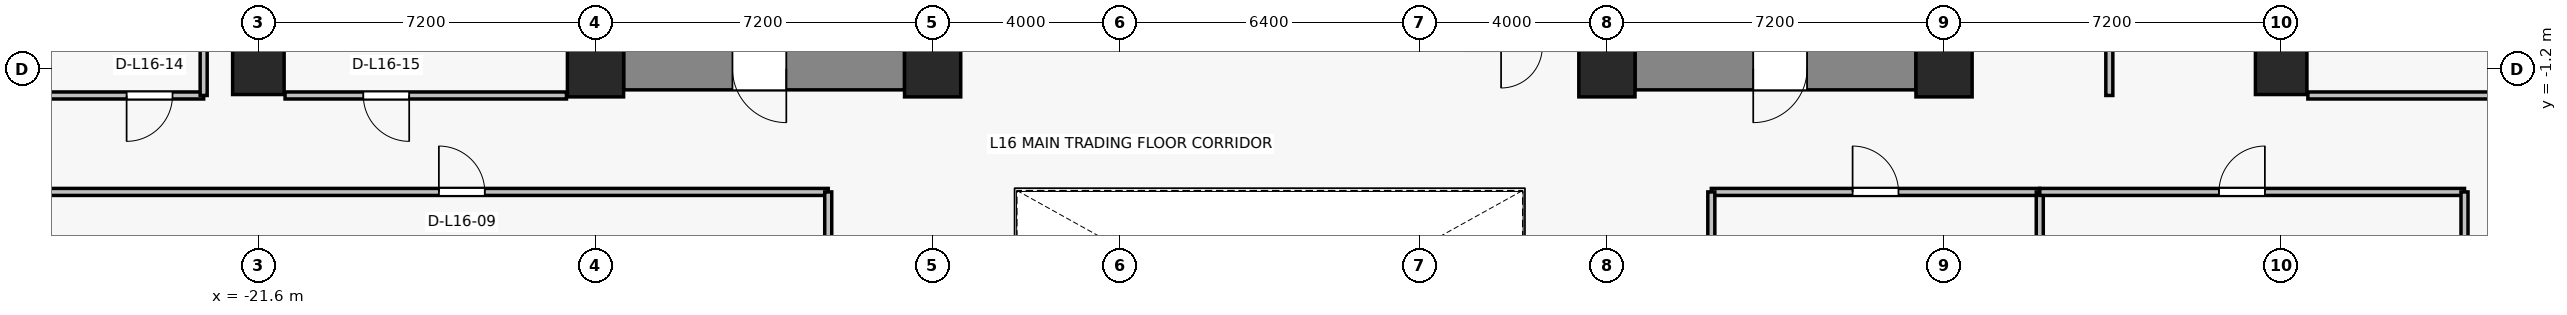
"""IFC4 building model, lengths in metres.
Left out: names, types, materials, properties, quantities, classifications, styles, units other than length and angle.
Written with IfcOpenShell. Run it as: python <this file> out.ifc"""

import sys

from ifc_helpers import new_model, si_unit, direction, frame, frame_2d, origin, origin_2d, place, context, subcontext, project, spatial, rectangle, extrude, source, transform, mapped, element, fill, save


model = new_model("IFC4")
c1 = context("Model", 3, precision=1e-05, world=origin(), true_north=direction((0.0, 1.0)))
c2 = subcontext(c1, "Body", "Model", "MODEL_VIEW")
j1 = project(units=[si_unit("LENGTHUNIT", "METRE"), si_unit("PLANEANGLEUNIT", "RADIAN")], contexts=[c1])
p1 = place(None, origin())
s1 = spatial("IfcSite", under=j1, at=p1, CompositionType="ELEMENT")
p2 = place(p1, origin())
s2 = spatial("IfcBuilding", under=s1, at=p2, CompositionType="ELEMENT")
p3 = place(p2, frame((0.0, 0.0, 60.4)))
s3 = spatial("IfcBuildingStorey", under=s2, at=p3, CompositionType="ELEMENT", Elevation=60.4)
for number, where, z_axis, x_axis in (
    (1, (-14.4, -1.2, 0.0), (0.0, 0.0, 1.0), (1.0, 0.0, 0.0)),
    (2, (-7.2, -1.2, 0.0), (0.0, 0.0, 1.0), (1.0, 0.0, 0.0)),
    (3, (7.2, -1.2, 0.0), (0.0, 0.0, 1.0), (1.0, 0.0, 0.0)),
    (4, (14.4, -1.2, 0.0), (0.0, 0.0, 1.0), (1.0, 0.0, 0.0)),
):
    element("IfcColumn", number, at=place(p3, frame(where, z_axis=z_axis, x_axis=x_axis)), inside=s3, PredefinedType="COLUMN", context=c2, shape_type="SweptSolid", body=[
        extrude(rectangle(XDim=1.2, YDim=1.2, at=origin_2d()), origin(), (0.0, 0.0, 1.0), 3.3),
    ])
for number, where, z_axis, x_axis in (
    (5, (-21.6, -1.2, 0.0), (0.0, 0.0, 1.0), (1.0, 0.0, 0.0)),
    (6, (21.6, -1.2, 0.0), (0.0, 0.0, 1.0), (1.0, 0.0, 0.0)),
):
    element("IfcColumn", number, at=place(p3, frame(where, z_axis=z_axis, x_axis=x_axis)), inside=s3, PredefinedType="COLUMN", context=c2, shape_type="SweptSolid", body=[
        extrude(rectangle(XDim=1.1, YDim=1.1, at=origin_2d()), origin(), (0.0, 0.0, 1.0), 3.3),
    ])
p4 = place(p3, frame((-7.8, -1.2, 0.0), z_axis=(0.0, 0.0, 1.0), x_axis=(-1.0, 0.0, 0.0)))
e7 = element("IfcWall", 7, at=p4, inside=s3, PredefinedType="SHEAR", context=c2, shape_type="SweptSolid", body=[
    extrude(rectangle(XDim=6.0, YDim=0.9, at=frame_2d((3.0, 0.0))), origin(), (0.0, 0.0, 1.0), 3.075),
])
p5 = place(p4, frame((2.525, 0.0, 0.0)))
e8 = element("IfcOpeningElement", 8, at=p5, cuts=e7, PredefinedType="OPENING", context=c2, shape_type="SweptSolid", body=[
    extrude(rectangle(XDim=1.15, YDim=2.15, at=frame_2d((0.575, 1.075))), frame((0.0, 0.46, 0.0), z_axis=(0.0, -1.0, 0.0), x_axis=(1.0, 0.0, 0.0)), (0.0, 0.0, 1.0), 0.92),
])
p6 = place(p3, frame((13.8, -1.2, 0.0), z_axis=(0.0, 0.0, 1.0), x_axis=(-1.0, 0.0, 0.0)))
e9 = element("IfcWall", 9, at=p6, inside=s3, PredefinedType="SHEAR", context=c2, shape_type="SweptSolid", body=[
    extrude(rectangle(XDim=6.0, YDim=0.9, at=frame_2d((3.0, 0.0))), origin(), (0.0, 0.0, 1.0), 3.075),
])
p7 = place(p6, frame((2.325, 0.0, 0.0)))
e10 = element("IfcOpeningElement", 10, at=p7, cuts=e9, PredefinedType="OPENING", context=c2, shape_type="SweptSolid", body=[
    extrude(rectangle(XDim=1.15, YDim=2.15, at=frame_2d((0.575, 1.075))), frame((0.0, 0.46, 0.0), z_axis=(0.0, -1.0, 0.0), x_axis=(1.0, 0.0, 0.0)), (0.0, 0.0, 1.0), 0.92),
])
p8 = place(p3, frame((-28.53, -3.83, 0.0), z_axis=(0.0, 0.0, 1.0), x_axis=(1.0, 0.0, 0.0)))
e11 = element("IfcWall", 11, at=p8, inside=s3, PredefinedType="PARTITIONING", context=c2, shape_type="SweptSolid", body=[
    extrude(rectangle(XDim=19.1, YDim=0.15, at=frame_2d((9.55, 0.0))), origin(), (0.0, 0.0, 1.0), 2.465),
])
p9 = place(p8, frame((10.785, 0.0, 0.0)))
e12 = element("IfcOpeningElement", 12, at=p9, cuts=e11, PredefinedType="OPENING", context=c2, shape_type="SweptSolid", body=[
    extrude(rectangle(XDim=0.98, YDim=2.15, at=frame_2d((0.49, 1.075))), frame((0.0, 0.085, 0.0), z_axis=(0.0, -1.0, 0.0), x_axis=(1.0, 0.0, 0.0)), (0.0, 0.0, 1.0), 0.17),
])
p10 = place(p3, frame((-9.43, -3.83, 0.0), z_axis=(0.0, 0.0, 1.0), x_axis=(0.0, -1.0, 0.0)))
e13 = element("IfcWall", 13, at=p10, inside=s3, PredefinedType="PARTITIONING", context=c2, shape_type="SweptSolid", body=[
    extrude(rectangle(XDim=8.49, YDim=0.15, at=frame_2d((4.245, 0.0))), origin(), (0.0, 0.0, 1.0), 2.465),
])
p11 = place(p3, frame((9.43, -3.83, 0.0), z_axis=(0.0, 0.0, 1.0), x_axis=(1.0, 0.0, 0.0)))
e14 = element("IfcWall", 14, at=p11, inside=s3, PredefinedType="PARTITIONING", context=c2, shape_type="SweptSolid", body=[
    extrude(rectangle(XDim=7.015, YDim=0.15, at=frame_2d((3.507, 0.0))), origin(), (0.0, 0.0, 1.0), 2.465),
])
p12 = place(p11, frame((3.017, 0.0, 0.0)))
e15 = element("IfcOpeningElement", 15, at=p12, cuts=e14, PredefinedType="OPENING", context=c2, shape_type="SweptSolid", body=[
    extrude(rectangle(XDim=0.98, YDim=2.15, at=frame_2d((0.49, 1.075))), frame((0.0, 0.085, 0.0), z_axis=(0.0, -1.0, 0.0), x_axis=(1.0, 0.0, 0.0)), (0.0, 0.0, 1.0), 0.17),
])
for number, where, z_axis, x_axis in (
    (16, (9.43, -12.32, 0.0), (0.0, 0.0, 1.0), (0.0, 1.0, 0.0)),
    (17, (16.445, -3.83, 0.0), (0.0, 0.0, 1.0), (0.0, -1.0, 0.0)),
):
    element("IfcWall", number, at=place(p3, frame(where, z_axis=z_axis, x_axis=x_axis)), inside=s3, PredefinedType="PARTITIONING", context=c2, shape_type="SweptSolid", body=[
        extrude(rectangle(XDim=8.49, YDim=0.15, at=frame_2d((4.245, 0.0))), origin(), (0.0, 0.0, 1.0), 2.465),
    ])
p13 = place(p3, frame((16.445, -3.83, 0.0), z_axis=(0.0, 0.0, 1.0), x_axis=(1.0, 0.0, 0.0)))
e18 = element("IfcWall", 18, at=p13, inside=s3, PredefinedType="PARTITIONING", context=c2, shape_type="SweptSolid", body=[
    extrude(rectangle(XDim=9.071, YDim=0.15, at=frame_2d((4.535, 0.0))), origin(), (0.0, 0.0, 1.0), 2.465),
])
p14 = place(p13, frame((3.827, 0.0, 0.0)))
e19 = element("IfcOpeningElement", 19, at=p14, cuts=e18, PredefinedType="OPENING", context=c2, shape_type="SweptSolid", body=[
    extrude(rectangle(XDim=0.98, YDim=2.15, at=frame_2d((0.49, 1.075))), frame((0.0, 0.085, 0.0), z_axis=(0.0, -1.0, 0.0), x_axis=(1.0, 0.0, 0.0)), (0.0, 0.0, 1.0), 0.17),
])
p15 = place(p3, frame((25.515, -3.83, 0.0), z_axis=(0.0, 0.0, 1.0), x_axis=(0.0, -1.0, 0.0)))
e20 = element("IfcWall", 20, at=p15, inside=s3, PredefinedType="PARTITIONING", context=c2, shape_type="SweptSolid", body=[
    extrude(rectangle(XDim=8.49, YDim=0.15, at=frame_2d((4.245, 0.0))), origin(), (0.0, 0.0, 1.0), 2.465),
])
p16 = place(p3, frame((-22.769, -1.77, 0.0), z_axis=(0.0, 0.0, 1.0), x_axis=(-1.0, 0.0, 0.0)))
e21 = element("IfcWall", 21, at=p16, inside=s3, PredefinedType="PARTITIONING", context=c2, shape_type="SweptSolid", body=[
    extrude(rectangle(XDim=5.761, YDim=0.15, at=frame_2d((2.881, 0.0))), origin(), (0.0, 0.0, 1.0), 2.465),
])
p17 = place(p16, frame((0.666, 0.0, 0.0)))
e22 = element("IfcOpeningElement", 22, at=p17, cuts=e21, PredefinedType="OPENING", context=c2, shape_type="SweptSolid", body=[
    extrude(rectangle(XDim=0.98, YDim=2.15, at=frame_2d((0.49, 1.075))), frame((0.0, 0.085, 0.0), z_axis=(0.0, -1.0, 0.0), x_axis=(1.0, 0.0, 0.0)), (0.0, 0.0, 1.0), 0.17),
])
p18 = place(p3, frame((-22.769, 13.88, 0.0), z_axis=(0.0, 0.0, 1.0), x_axis=(0.0, -1.0, 0.0)))
e23 = element("IfcWall", 23, at=p18, inside=s3, PredefinedType="PARTITIONING", context=c2, shape_type="SweptSolid", body=[
    extrude(rectangle(XDim=15.65, YDim=0.15, at=frame_2d((7.825, 0.0))), origin(), (0.0, 0.0, 1.0), 2.465),
])
p19 = place(p3, frame((-15.02, -1.77, 0.0), z_axis=(0.0, 0.0, 1.0), x_axis=(-1.0, 0.0, 0.0)))
e24 = element("IfcWall", 24, at=p19, inside=s3, PredefinedType="PARTITIONING", context=c2, shape_type="SweptSolid", body=[
    extrude(rectangle(XDim=6.01, YDim=0.15, at=frame_2d((3.005, 0.0))), origin(), (0.0, 0.0, 1.0), 3.075),
])
p20 = place(p19, frame((3.359, 0.0, 0.0)))
e25 = element("IfcOpeningElement", 25, at=p20, cuts=e24, PredefinedType="OPENING", context=c2, shape_type="SweptSolid", body=[
    extrude(rectangle(XDim=0.98, YDim=2.15, at=frame_2d((0.49, 1.075))), frame((0.0, 0.085, 0.0), z_axis=(0.0, -1.0, 0.0), x_axis=(1.0, 0.0, 0.0)), (0.0, 0.0, 1.0), 0.17),
])
p21 = place(p3, frame((32.53, -1.77, 0.0), z_axis=(0.0, 0.0, 1.0), x_axis=(-1.0, 0.0, 0.0)))
e26 = element("IfcWall", 26, at=p21, inside=s3, PredefinedType="PARTITIONING", context=c2, shape_type="SweptSolid", body=[
    extrude(rectangle(XDim=10.36, YDim=0.15, at=frame_2d((5.18, 0.0))), origin(), (0.0, 0.0, 1.0), 2.465),
])
p22 = place(p3, frame((17.93, -1.77, 0.0), z_axis=(0.0, 0.0, 1.0), x_axis=(0.0, 1.0, 0.0)))
e27 = element("IfcWall", 27, at=p22, inside=s3, PredefinedType="PARTITIONING", context=c2, shape_type="SweptSolid", body=[
    extrude(rectangle(XDim=15.65, YDim=0.15, at=frame_2d((7.825, 0.0))), origin(), (0.0, 0.0, 1.0), 2.465),
])
p23 = place(p22, frame((7.335, 0.0, 0.0)))
e28 = element("IfcOpeningElement", 28, at=p23, cuts=e27, PredefinedType="OPENING", context=c2, shape_type="SweptSolid", body=[
    extrude(rectangle(XDim=0.98, YDim=2.15, at=frame_2d((0.49, 1.075))), frame((0.0, 0.085, 0.0), z_axis=(0.0, -1.0, 0.0), x_axis=(1.0, 0.0, 0.0)), (0.0, 0.0, 1.0), 0.17),
])
m1 = source(origin(), c2, "Body", "SweptSolid", [
    extrude(rectangle(XDim=1.15, YDim=2.15, at=frame_2d((0.575, 1.075))), frame((0.0, 0.025, 0.0), z_axis=(0.0, -1.0, 0.0), x_axis=(1.0, 0.0, 0.0)), (0.0, 0.0, 1.0), 0.05),
])
p24 = place(p5, origin())
e29 = element("IfcDoor", 29, at=p24, inside=s3, OperationType="SINGLE_SWING_LEFT", PredefinedType="DOOR", context=c2, shape_type="MappedRepresentation", body=[
    mapped(m1, transform((0.0, 0.0, 0.0), x_axis=(1.0, 0.0, 0.0), y_axis=(0.0, 1.0, 0.0), z_axis=(0.0, 0.0, 1.0), scale=1.0)),
])
fill(e8, e29)
p25 = place(p7, origin())
e30 = element("IfcDoor", 30, at=p25, inside=s3, OperationType="SINGLE_SWING_RIGHT", PredefinedType="DOOR", context=c2, shape_type="MappedRepresentation", body=[
    mapped(m1, transform((0.0, 0.0, 0.0), x_axis=(1.0, 0.0, 0.0), y_axis=(0.0, 1.0, 0.0), z_axis=(0.0, 0.0, 1.0), scale=1.0)),
])
fill(e10, e30)
m2 = source(origin(), c2, "Body", "SweptSolid", [
    extrude(rectangle(XDim=0.98, YDim=2.15, at=frame_2d((0.49, 1.075))), frame((0.0, 0.025, 0.0), z_axis=(0.0, -1.0, 0.0), x_axis=(1.0, 0.0, 0.0)), (0.0, 0.0, 1.0), 0.05),
])
p26 = place(p9, origin())
e31 = element("IfcDoor", 31, at=p26, inside=s3, OperationType="SINGLE_SWING_LEFT", PredefinedType="DOOR", context=c2, shape_type="MappedRepresentation", body=[
    mapped(m2, transform((0.0, 0.0, 0.0), x_axis=(1.0, 0.0, 0.0), y_axis=(0.0, 1.0, 0.0), z_axis=(0.0, 0.0, 1.0), scale=1.0)),
])
fill(e12, e31)
p27 = place(p12, origin())
e32 = element("IfcDoor", 32, at=p27, inside=s3, OperationType="SINGLE_SWING_LEFT", PredefinedType="DOOR", context=c2, shape_type="MappedRepresentation", body=[
    mapped(m2, transform((0.0, 0.0, 0.0), x_axis=(1.0, 0.0, 0.0), y_axis=(0.0, 1.0, 0.0), z_axis=(0.0, 0.0, 1.0), scale=1.0)),
])
fill(e15, e32)
p28 = place(p14, origin())
e33 = element("IfcDoor", 33, at=p28, inside=s3, OperationType="SINGLE_SWING_RIGHT", PredefinedType="DOOR", context=c2, shape_type="MappedRepresentation", body=[
    mapped(m2, transform((0.0, 0.0, 0.0), x_axis=(1.0, 0.0, 0.0), y_axis=(0.0, 1.0, 0.0), z_axis=(0.0, 0.0, 1.0), scale=1.0)),
])
fill(e19, e33)
p29 = place(p17, origin())
e34 = element("IfcDoor", 34, at=p29, inside=s3, OperationType="SINGLE_SWING_RIGHT", PredefinedType="DOOR", context=c2, shape_type="MappedRepresentation", body=[
    mapped(m2, transform((0.0, 0.0, 0.0), x_axis=(1.0, 0.0, 0.0), y_axis=(0.0, 1.0, 0.0), z_axis=(0.0, 0.0, 1.0), scale=1.0)),
])
fill(e22, e34)
p30 = place(p20, origin())
e35 = element("IfcDoor", 35, at=p30, inside=s3, OperationType="SINGLE_SWING_LEFT", PredefinedType="DOOR", context=c2, shape_type="MappedRepresentation", body=[
    mapped(m2, transform((0.0, 0.0, 0.0), x_axis=(1.0, 0.0, 0.0), y_axis=(0.0, 1.0, 0.0), z_axis=(0.0, 0.0, 1.0), scale=1.0)),
])
fill(e25, e35)
save(model, sys.argv[1])
